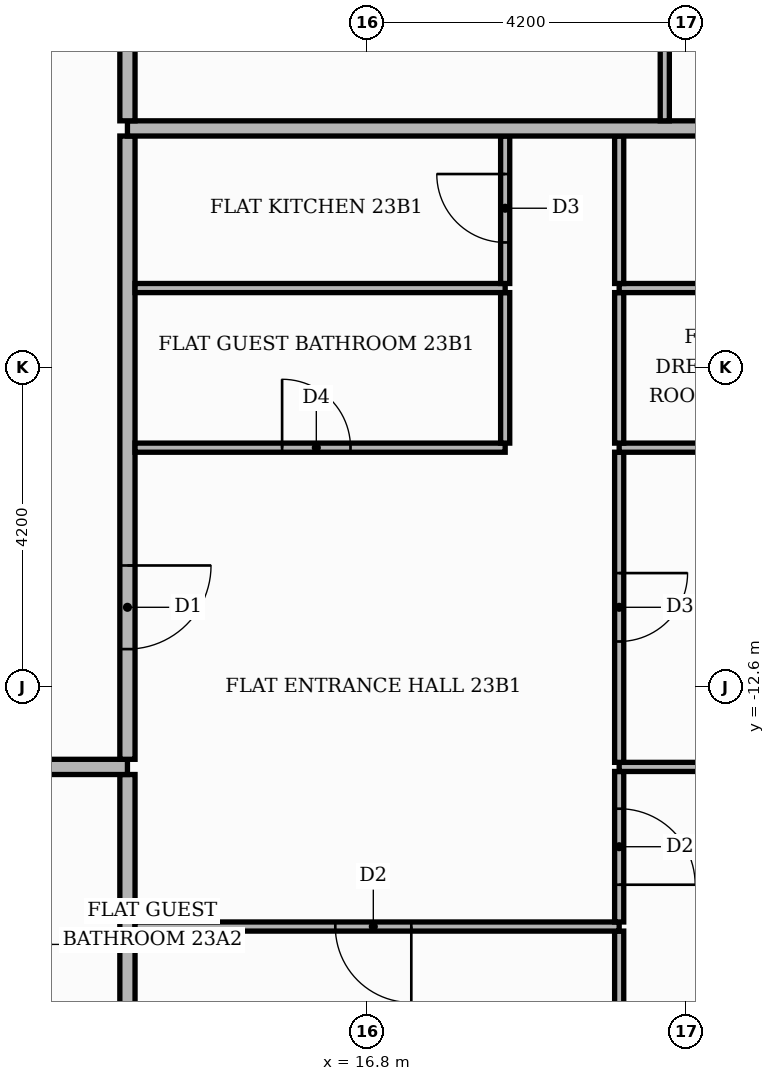
"""IFC4 building model, lengths in metres.
Left out: names, types, materials, properties, quantities, classifications, styles, units other than length and angle.
Written with IfcOpenShell. Run it as: python <this file> out.ifc"""

import sys

from ifc_helpers import new_model, si_unit, direction, frame, frame_2d, origin, place, context, subcontext, project, spatial, rectangle, extrude, element, fill, save


model = new_model("IFC4")
c1 = context("Model", 3, precision=1e-05, world=origin(), true_north=direction((0.0, 1.0)))
c2 = subcontext(c1, "Body", "Model", "MODEL_VIEW")
j1 = project(units=[si_unit("LENGTHUNIT", "METRE"), si_unit("PLANEANGLEUNIT", "RADIAN")], contexts=[c1])
p1 = place(None, origin())
s1 = spatial("IfcSite", under=j1, at=p1, CompositionType="ELEMENT")
p2 = place(p1, origin())
s2 = spatial("IfcBuilding", under=s1, at=p2, CompositionType="ELEMENT")
p3 = place(p2, frame((0.0, 0.0, 98.7)))
s3 = spatial("IfcBuildingStorey", under=s2, at=p3, CompositionType="ELEMENT", Elevation=98.7)
p4 = place(p3, frame((13.65, -25.42, 0.0), z_axis=(0.0, 0.0, 1.0), x_axis=(0.0, 1.0, 0.0)))
e1 = element("IfcWall", 1, at=p4, inside=s3, PredefinedType="PARTITIONING", context=c2, shape_type="SweptSolid", body=[
    extrude(rectangle(XDim=11.67, YDim=0.2, at=frame_2d((5.835, 0.0))), origin(), (0.0, 0.0, 1.0), 3.48),
])
p5 = place(p3, frame((20.12, -17.4, 0.0), z_axis=(0.0, 0.0, 1.0), x_axis=(0.0, 1.0, 0.0)))
e2 = element("IfcWall", 2, at=p5, inside=s3, PredefinedType="PARTITIONING", context=c2, shape_type="SweptSolid", body=[
    extrude(rectangle(XDim=1.59, YDim=0.12, at=frame_2d((0.795, 0.0))), origin(), (0.0, 0.0, 1.0), 3.48),
])
p6 = place(p3, frame((13.75, -15.75, 0.0), z_axis=(0.0, 0.0, 1.0), x_axis=(1.0, 0.0, 0.0)))
e3 = element("IfcWall", 3, at=p6, inside=s3, PredefinedType="PARTITIONING", context=c2, shape_type="SweptSolid", body=[
    extrude(rectangle(XDim=6.37, YDim=0.12, at=frame_2d((3.185, 0.0))), origin(), (0.0, 0.0, 1.0), 3.48),
])
p7 = place(p6, frame((2.635, 0.0, 0.0)))
e4 = element("IfcOpeningElement", 4, at=p7, cuts=e3, PredefinedType="OPENING", context=c2, shape_type="SweptSolid", body=[
    extrude(rectangle(XDim=1.0, YDim=2.1, at=frame_2d((0.5, 1.05))), frame((0.0, 0.07, 0.0), z_axis=(0.0, -1.0, 0.0), x_axis=(1.0, 0.0, 0.0)), (0.0, 0.0, 1.0), 0.14),
])
p8 = place(p3, frame((20.12, -15.69, 0.0), z_axis=(0.0, 0.0, 1.0), x_axis=(0.0, 1.0, 0.0)))
e5 = element("IfcWall", 5, at=p8, inside=s3, PredefinedType="PARTITIONING", context=c2, shape_type="SweptSolid", body=[
    extrude(rectangle(XDim=1.98, YDim=0.12, at=frame_2d((0.99, 0.0))), origin(), (0.0, 0.0, 1.0), 3.48),
])
p9 = place(p8, frame((0.49, 0.0, 0.0)))
e6 = element("IfcOpeningElement", 6, at=p9, cuts=e5, PredefinedType="OPENING", context=c2, shape_type="SweptSolid", body=[
    extrude(rectangle(XDim=1.0, YDim=2.1, at=frame_2d((0.5, 1.05))), frame((0.0, 0.07, 0.0), z_axis=(0.0, -1.0, 0.0), x_axis=(1.0, 0.0, 0.0)), (0.0, 0.0, 1.0), 0.14),
])
p10 = place(p3, frame((-25.42, -13.65, 0.0), z_axis=(0.0, 0.0, 1.0), x_axis=(1.0, 0.0, 0.0)))
e7 = element("IfcWall", 7, at=p10, inside=s3, PredefinedType="PARTITIONING", context=c2, shape_type="SweptSolid", body=[
    extrude(rectangle(XDim=39.07, YDim=0.2, at=frame_2d((19.535, 0.0))), origin(), (0.0, 0.0, 1.0), 3.48),
])
p11 = place(p10, frame((13.32, 0.0, 0.0)))
e8 = element("IfcOpeningElement", 8, at=p11, cuts=e7, PredefinedType="OPENING", context=c2, shape_type="SweptSolid", body=[
    extrude(rectangle(XDim=1.1, YDim=2.4, at=frame_2d((0.55, 1.2))), frame((0.0, 0.11, 0.0), z_axis=(0.0, -1.0, 0.0), x_axis=(1.0, 0.0, 0.0)), (0.0, 0.0, 1.0), 0.22),
])
p12 = place(p10, frame((23.82, 0.0, 0.0)))
e9 = element("IfcOpeningElement", 9, at=p12, cuts=e7, PredefinedType="OPENING", context=c2, shape_type="SweptSolid", body=[
    extrude(rectangle(XDim=1.1, YDim=2.4, at=frame_2d((0.55, 1.2))), frame((0.0, 0.11, 0.0), z_axis=(0.0, -1.0, 0.0), x_axis=(1.0, 0.0, 0.0)), (0.0, 0.0, 1.0), 0.22),
])
p13 = place(p3, frame((20.12, -13.65, 0.0), z_axis=(0.0, 0.0, 1.0), x_axis=(1.0, 0.0, 0.0)))
e10 = element("IfcWall", 10, at=p13, inside=s3, PredefinedType="PARTITIONING", context=c2, shape_type="SweptSolid", body=[
    extrude(rectangle(XDim=5.3, YDim=0.12, at=frame_2d((2.65, 0.0))), origin(), (0.0, 0.0, 1.0), 3.48),
])
p14 = place(p3, frame((20.12, -13.59, 0.0), z_axis=(0.0, 0.0, 1.0), x_axis=(0.0, 1.0, 0.0)))
e11 = element("IfcWall", 11, at=p14, inside=s3, PredefinedType="PARTITIONING", context=c2, shape_type="SweptSolid", body=[
    extrude(rectangle(XDim=4.08, YDim=0.12, at=frame_2d((2.04, 0.0))), origin(), (0.0, 0.0, 1.0), 3.48),
])
p15 = place(p14, frame((1.59, 0.0, 0.0)))
e12 = element("IfcOpeningElement", 12, at=p15, cuts=e11, PredefinedType="OPENING", context=c2, shape_type="SweptSolid", body=[
    extrude(rectangle(XDim=0.9, YDim=2.1, at=frame_2d((0.45, 1.05))), frame((0.0, 0.07, 0.0), z_axis=(0.0, -1.0, 0.0), x_axis=(1.0, 0.0, 0.0)), (0.0, 0.0, 1.0), 0.14),
])
p16 = place(p3, frame((13.65, -13.55, 0.0), z_axis=(0.0, 0.0, 1.0), x_axis=(0.0, 1.0, 0.0)))
e13 = element("IfcWall", 13, at=p16, inside=s3, PredefinedType="PARTITIONING", context=c2, shape_type="SweptSolid", body=[
    extrude(rectangle(XDim=8.2, YDim=0.2, at=frame_2d((4.1, 0.0))), origin(), (0.0, 0.0, 1.0), 3.48),
])
p17 = place(p16, frame((1.45, 0.0, 0.0)))
e14 = element("IfcOpeningElement", 14, at=p17, cuts=e13, PredefinedType="OPENING", context=c2, shape_type="SweptSolid", body=[
    extrude(rectangle(XDim=1.1, YDim=2.4, at=frame_2d((0.55, 1.2))), frame((0.0, 0.11, 0.0), z_axis=(0.0, -1.0, 0.0), x_axis=(1.0, 0.0, 0.0)), (0.0, 0.0, 1.0), 0.22),
])
p18 = place(p3, frame((13.75, -9.45, 0.0), z_axis=(0.0, 0.0, 1.0), x_axis=(1.0, 0.0, 0.0)))
e15 = element("IfcWall", 15, at=p18, inside=s3, PredefinedType="PARTITIONING", context=c2, shape_type="SweptSolid", body=[
    extrude(rectangle(XDim=4.87, YDim=0.12, at=frame_2d((2.435, 0.0))), origin(), (0.0, 0.0, 1.0), 3.48),
])
p19 = place(p18, frame((1.935, 0.0, 0.0)))
e16 = element("IfcOpeningElement", 16, at=p19, cuts=e15, PredefinedType="OPENING", context=c2, shape_type="SweptSolid", body=[
    extrude(rectangle(XDim=0.9, YDim=2.1, at=frame_2d((0.45, 1.05))), frame((0.0, 0.07, 0.0), z_axis=(0.0, -1.0, 0.0), x_axis=(1.0, 0.0, 0.0)), (0.0, 0.0, 1.0), 0.14),
])
p20 = place(p3, frame((20.12, -9.45, 0.0), z_axis=(0.0, 0.0, 1.0), x_axis=(1.0, 0.0, 0.0)))
e17 = element("IfcWall", 17, at=p20, inside=s3, PredefinedType="PARTITIONING", context=c2, shape_type="SweptSolid", body=[
    extrude(rectangle(XDim=5.3, YDim=0.12, at=frame_2d((2.65, 0.0))), origin(), (0.0, 0.0, 1.0), 3.48),
])
p21 = place(p20, frame((2.35, 0.0, 0.0)))
e18 = element("IfcOpeningElement", 18, at=p21, cuts=e17, PredefinedType="OPENING", context=c2, shape_type="SweptSolid", body=[
    extrude(rectangle(XDim=0.9, YDim=2.1, at=frame_2d((0.45, 1.05))), frame((0.0, 0.07, 0.0), z_axis=(0.0, -1.0, 0.0), x_axis=(1.0, 0.0, 0.0)), (0.0, 0.0, 1.0), 0.14),
])
for number, where, z_axis, x_axis in (
    (19, (18.62, -9.39, 0.0), (0.0, 0.0, 1.0), (0.0, 1.0, 0.0)),
    (20, (20.12, -9.39, 0.0), (0.0, 0.0, 1.0), (0.0, 1.0, 0.0)),
):
    element("IfcWall", number, at=place(p3, frame(where, z_axis=z_axis, x_axis=x_axis)), inside=s3, PredefinedType="PARTITIONING", context=c2, shape_type="SweptSolid", body=[
        extrude(rectangle(XDim=1.98, YDim=0.12, at=frame_2d((0.99, 0.0))), origin(), (0.0, 0.0, 1.0), 3.48),
    ])
p22 = place(p3, frame((13.75, -7.35, 0.0), z_axis=(0.0, 0.0, 1.0), x_axis=(1.0, 0.0, 0.0)))
e21 = element("IfcWall", 21, at=p22, inside=s3, PredefinedType="PARTITIONING", context=c2, shape_type="SweptSolid", body=[
    extrude(rectangle(XDim=4.87, YDim=0.12, at=frame_2d((2.435, 0.0))), origin(), (0.0, 0.0, 1.0), 3.48),
])
p23 = place(p3, frame((20.12, -7.35, 0.0), z_axis=(0.0, 0.0, 1.0), x_axis=(1.0, 0.0, 0.0)))
e22 = element("IfcWall", 22, at=p23, inside=s3, PredefinedType="PARTITIONING", context=c2, shape_type="SweptSolid", body=[
    extrude(rectangle(XDim=5.3, YDim=0.12, at=frame_2d((2.65, 0.0))), origin(), (0.0, 0.0, 1.0), 3.48),
])
p24 = place(p23, frame((2.35, 0.0, 0.0)))
e23 = element("IfcOpeningElement", 23, at=p24, cuts=e22, PredefinedType="OPENING", context=c2, shape_type="SweptSolid", body=[
    extrude(rectangle(XDim=0.9, YDim=2.1, at=frame_2d((0.45, 1.05))), frame((0.0, 0.07, 0.0), z_axis=(0.0, -1.0, 0.0), x_axis=(1.0, 0.0, 0.0)), (0.0, 0.0, 1.0), 0.14),
])
p25 = place(p3, frame((18.62, -7.29, 0.0), z_axis=(0.0, 0.0, 1.0), x_axis=(0.0, 1.0, 0.0)))
e24 = element("IfcWall", 24, at=p25, inside=s3, PredefinedType="PARTITIONING", context=c2, shape_type="SweptSolid", body=[
    extrude(rectangle(XDim=1.94, YDim=0.12, at=frame_2d((0.97, 0.0))), origin(), (0.0, 0.0, 1.0), 3.48),
])
p26 = place(p25, frame((0.54, 0.0, 0.0)))
e25 = element("IfcOpeningElement", 25, at=p26, cuts=e24, PredefinedType="OPENING", context=c2, shape_type="SweptSolid", body=[
    extrude(rectangle(XDim=0.9, YDim=2.1, at=frame_2d((0.45, 1.05))), frame((0.0, 0.07, 0.0), z_axis=(0.0, -1.0, 0.0), x_axis=(1.0, 0.0, 0.0)), (0.0, 0.0, 1.0), 0.14),
])
p27 = place(p3, frame((20.12, -7.29, 0.0), z_axis=(0.0, 0.0, 1.0), x_axis=(0.0, 1.0, 0.0)))
e26 = element("IfcWall", 26, at=p27, inside=s3, PredefinedType="PARTITIONING", context=c2, shape_type="SweptSolid", body=[
    extrude(rectangle(XDim=1.94, YDim=0.12, at=frame_2d((0.97, 0.0))), origin(), (0.0, 0.0, 1.0), 3.48),
])
p28 = place(p3, frame((13.65, -5.25, 0.0), z_axis=(0.0, 0.0, 1.0), x_axis=(1.0, 0.0, 0.0)))
e27 = element("IfcWall", 27, at=p28, inside=s3, PredefinedType="PARTITIONING", context=c2, shape_type="SweptSolid", body=[
    extrude(rectangle(XDim=11.77, YDim=0.2, at=frame_2d((5.885, 0.0))), origin(), (0.0, 0.0, 1.0), 3.48),
])
p29 = place(p3, frame((13.65, -5.15, 0.0), z_axis=(0.0, 0.0, 1.0), x_axis=(0.0, 1.0, 0.0)))
e28 = element("IfcWall", 28, at=p29, inside=s3, PredefinedType="PARTITIONING", context=c2, shape_type="SweptSolid", body=[
    extrude(rectangle(XDim=18.7, YDim=0.2, at=frame_2d((9.35, 0.0))), origin(), (0.0, 0.0, 1.0), 3.48),
])
p30 = place(p29, frame((1.45, 0.0, 0.0)))
e29 = element("IfcOpeningElement", 29, at=p30, cuts=e28, PredefinedType="OPENING", context=c2, shape_type="SweptSolid", body=[
    extrude(rectangle(XDim=1.1, YDim=2.4, at=frame_2d((0.55, 1.2))), frame((0.0, 0.11, 0.0), z_axis=(0.0, -1.0, 0.0), x_axis=(1.0, 0.0, 0.0)), (0.0, 0.0, 1.0), 0.22),
])
p31 = place(p3, frame((20.72, -5.15, 0.0), z_axis=(0.0, 0.0, 1.0), x_axis=(0.0, 1.0, 0.0)))
e30 = element("IfcWall", 30, at=p31, inside=s3, PredefinedType="PARTITIONING", context=c2, shape_type="SweptSolid", body=[
    extrude(rectangle(XDim=4.04, YDim=0.12, at=frame_2d((2.02, 0.0))), origin(), (0.0, 0.0, 1.0), 3.48),
])
p32 = place(p31, frame((1.5, 0.0, 0.0)))
e31 = element("IfcOpeningElement", 31, at=p32, cuts=e30, PredefinedType="OPENING", context=c2, shape_type="SweptSolid", body=[
    extrude(rectangle(XDim=1.0, YDim=2.1, at=frame_2d((0.5, 1.05))), frame((0.0, 0.07, 0.0), z_axis=(0.0, -1.0, 0.0), x_axis=(1.0, 0.0, 0.0)), (0.0, 0.0, 1.0), 0.14),
])
p33 = place(p17, frame((1.1, 0.0, 0.0), z_axis=(0.0, 0.0, 1.0), x_axis=(-1.0, 0.0, 0.0)))
e32 = element("IfcDoor", 32, at=p33, inside=s3, OperationType="SINGLE_SWING_RIGHT", PredefinedType="DOOR", context=c2, shape_type="SweptSolid", body=[
    extrude(rectangle(XDim=1.1, YDim=2.4, at=frame_2d((0.55, 1.2))), frame((0.0, 0.025, 0.0), z_axis=(0.0, -1.0, 0.0), x_axis=(1.0, 0.0, 0.0)), (0.0, 0.0, 1.0), 0.05),
])
fill(e14, e32)
p34 = place(p7, frame((1.0, 0.0, 0.0), z_axis=(0.0, 0.0, 1.0), x_axis=(-1.0, 0.0, 0.0)))
e33 = element("IfcDoor", 33, at=p34, inside=s3, OperationType="SINGLE_SWING_RIGHT", PredefinedType="DOOR", context=c2, shape_type="SweptSolid", body=[
    extrude(rectangle(XDim=1.0, YDim=2.1, at=frame_2d((0.5, 1.05))), frame((0.0, 0.025, 0.0), z_axis=(0.0, -1.0, 0.0), x_axis=(1.0, 0.0, 0.0)), (0.0, 0.0, 1.0), 0.05),
])
fill(e4, e33)
p35 = place(p19, origin())
e34 = element("IfcDoor", 34, at=p35, inside=s3, OperationType="SINGLE_SWING_LEFT", PredefinedType="DOOR", context=c2, shape_type="SweptSolid", body=[
    extrude(rectangle(XDim=0.9, YDim=2.1, at=frame_2d((0.45, 1.05))), frame((0.0, 0.025, 0.0), z_axis=(0.0, -1.0, 0.0), x_axis=(1.0, 0.0, 0.0)), (0.0, 0.0, 1.0), 0.05),
])
fill(e16, e34)
p36 = place(p26, origin())
e35 = element("IfcDoor", 35, at=p36, inside=s3, OperationType="SINGLE_SWING_RIGHT", PredefinedType="DOOR", context=c2, shape_type="SweptSolid", body=[
    extrude(rectangle(XDim=0.9, YDim=2.1, at=frame_2d((0.45, 1.05))), frame((0.0, 0.025, 0.0), z_axis=(0.0, -1.0, 0.0), x_axis=(1.0, 0.0, 0.0)), (0.0, 0.0, 1.0), 0.05),
])
fill(e25, e35)
p37 = place(p9, frame((1.0, 0.0, 0.0), z_axis=(0.0, 0.0, 1.0), x_axis=(-1.0, 0.0, 0.0)))
e36 = element("IfcDoor", 36, at=p37, inside=s3, OperationType="SINGLE_SWING_LEFT", PredefinedType="DOOR", context=c2, shape_type="SweptSolid", body=[
    extrude(rectangle(XDim=1.0, YDim=2.1, at=frame_2d((0.5, 1.05))), frame((0.0, 0.025, 0.0), z_axis=(0.0, -1.0, 0.0), x_axis=(1.0, 0.0, 0.0)), (0.0, 0.0, 1.0), 0.05),
])
fill(e6, e36)
p38 = place(p15, frame((0.9, 0.0, 0.0), z_axis=(0.0, 0.0, 1.0), x_axis=(-1.0, 0.0, 0.0)))
e37 = element("IfcDoor", 37, at=p38, inside=s3, OperationType="SINGLE_SWING_RIGHT", PredefinedType="DOOR", context=c2, shape_type="SweptSolid", body=[
    extrude(rectangle(XDim=0.9, YDim=2.1, at=frame_2d((0.45, 1.05))), frame((0.0, 0.025, 0.0), z_axis=(0.0, -1.0, 0.0), x_axis=(1.0, 0.0, 0.0)), (0.0, 0.0, 1.0), 0.05),
])
fill(e12, e37)
save(model, sys.argv[1])
